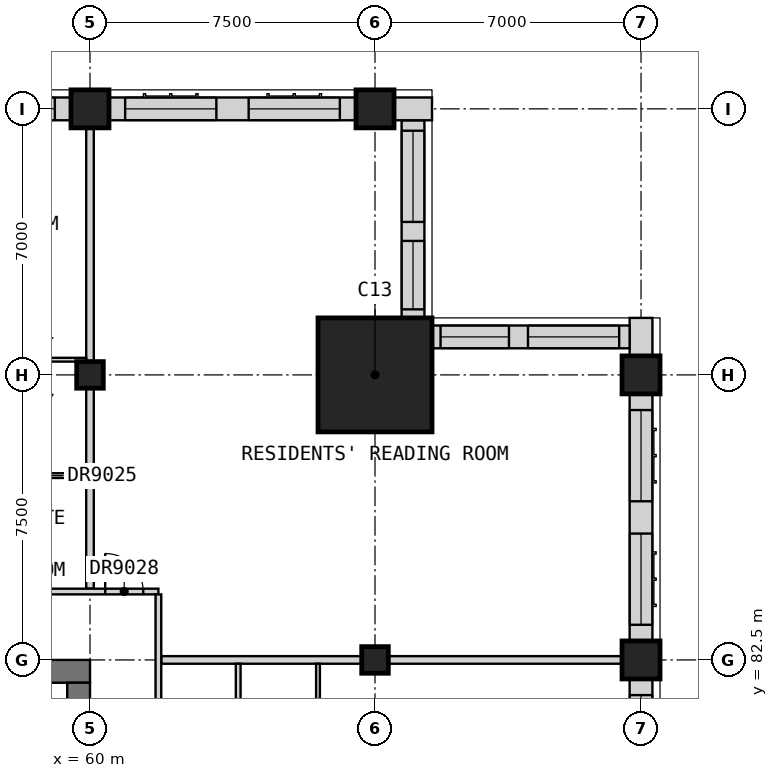
"""IFC4 building model, lengths in metres.
Left out: names, types, materials, properties, quantities, classifications, styles, units other than length and angle.
Written with IfcOpenShell. Run it as: python <this file> out.ifc"""

import sys

from ifc_helpers import new_model, si_unit, direction, frame, frame_2d, origin, origin_2d, place, context, subcontext, project, spatial, rectangle, extrude, element, fill, save


model = new_model("IFC4")
c1 = context("Model", 3, precision=1e-05, world=origin(), true_north=direction((0.0, 1.0)))
c2 = subcontext(c1, "Body", "Model", "MODEL_VIEW")
j1 = project(units=[si_unit("LENGTHUNIT", "METRE"), si_unit("PLANEANGLEUNIT", "RADIAN")], contexts=[c1])
p1 = place(None, origin())
s1 = spatial("IfcSite", under=j1, at=p1, CompositionType="ELEMENT")
p2 = place(p1, origin())
s2 = spatial("IfcBuilding", under=s1, at=p2, CompositionType="ELEMENT")
p3 = place(p2, frame((0.0, 0.0, 280.2)))
s3 = spatial("IfcBuildingStorey", under=s2, at=p3, CompositionType="ELEMENT", Elevation=280.2)
p4 = place(p3, frame((60.0, 90.0, 0.0), z_axis=(0.0, 0.0, 1.0), x_axis=(1.0, 0.0, 0.0)))
e1 = element("IfcColumn", 1, at=p4, inside=s3, PredefinedType="COLUMN", context=c2, shape_type="SweptSolid", body=[
    extrude(rectangle(XDim=0.7, YDim=0.7, at=origin_2d()), origin(), (0.0, 0.0, 1.0), 3.5),
])
p5 = place(p3, frame((60.0, 97.0, 0.0), z_axis=(0.0, 0.0, 1.0), x_axis=(1.0, 0.0, 0.0)))
e2 = element("IfcColumn", 2, at=p5, inside=s3, PredefinedType="COLUMN", context=c2, shape_type="SweptSolid", body=[
    extrude(rectangle(XDim=1.0, YDim=1.0, at=origin_2d()), origin(), (0.0, 0.0, 1.0), 3.5),
])
p6 = place(p3, frame((67.5, 82.5, 0.0), z_axis=(0.0, 0.0, 1.0), x_axis=(1.0, 0.0, 0.0)))
e3 = element("IfcColumn", 3, at=p6, inside=s3, PredefinedType="COLUMN", context=c2, shape_type="SweptSolid", body=[
    extrude(rectangle(XDim=0.7, YDim=0.7, at=origin_2d()), origin(), (0.0, 0.0, 1.0), 3.5),
])
for number, where, z_axis, x_axis in (
    (4, (67.5, 97.0, 0.0), (0.0, 0.0, 1.0), (1.0, 0.0, 0.0)),
    (5, (74.5, 82.5, 0.0), (0.0, 0.0, 1.0), (1.0, 0.0, 0.0)),
    (6, (74.5, 90.0, 0.0), (0.0, 0.0, 1.0), (1.0, 0.0, 0.0)),
):
    element("IfcColumn", number, at=place(p3, frame(where, z_axis=z_axis, x_axis=x_axis)), inside=s3, PredefinedType="COLUMN", context=c2, shape_type="SweptSolid", body=[
        extrude(rectangle(XDim=1.0, YDim=1.0, at=origin_2d()), origin(), (0.0, 0.0, 1.0), 3.5),
    ])
p7 = place(p3, frame((67.5, 90.0, 0.0), z_axis=(0.0, 0.0, 1.0), x_axis=(1.0, 0.0, 0.0)))
e7 = element("IfcColumn", 7, at=p7, inside=s3, PredefinedType="COLUMN", context=c2, shape_type="SweptSolid", body=[
    extrude(rectangle(XDim=3.0, YDim=3.0, at=origin_2d()), origin(), (0.0, 0.0, 1.0), 3.5),
])
p8 = place(p3, frame((30.0, 82.2, 0.0), z_axis=(0.0, 0.0, 1.0), x_axis=(1.0, 0.0, 0.0)))
e8 = element("IfcWall", 8, at=p8, inside=s3, PredefinedType="SHEAR", context=c2, shape_type="SweptSolid", body=[
    extrude(rectangle(XDim=30.0, YDim=0.6, at=frame_2d((15.0, 0.0))), origin(), (0.0, 0.0, 1.0), 3.5),
])
p9 = place(p3, frame((59.7, 60.6, 0.0), z_axis=(0.0, 0.0, 1.0), x_axis=(0.0, 1.0, 0.0)))
e9 = element("IfcWall", 9, at=p9, inside=s3, PredefinedType="SHEAR", context=c2, shape_type="SweptSolid", body=[
    extrude(rectangle(XDim=21.3, YDim=0.6, at=frame_2d((10.65, 0.0))), origin(), (0.0, 0.0, 1.0), 3.5),
])
p10 = place(p9, frame((14.9, 0.0, 0.0)))
e10 = element("IfcOpeningElement", 10, at=p10, cuts=e9, PredefinedType="OPENING", context=c2, shape_type="SweptSolid", body=[
    extrude(rectangle(XDim=1.8, YDim=2.1, at=frame_2d((0.9, 1.05))), frame((0.0, 0.31, 0.0), z_axis=(0.0, -1.0, 0.0), x_axis=(1.0, 0.0, 0.0)), (0.0, 0.0, 1.0), 0.62),
])
p11 = place(p3, frame((74.5, 75.5, 0.0), z_axis=(0.0, 0.0, 1.0), x_axis=(0.0, 1.0, 0.0)))
e11 = element("IfcWall", 11, at=p11, inside=s3, PredefinedType="SOLIDWALL", context=c2, shape_type="SweptSolid", body=[
    extrude(rectangle(XDim=6.5, YDim=0.6, at=frame_2d((3.25, 0.0))), origin(), (0.0, 0.0, 1.0), 2.75),
])
p12 = place(p11, frame((0.425, 0.0, 0.8)))
e12 = element("IfcOpeningElement", 12, at=p12, cuts=e11, PredefinedType="OPENING", context=c2, shape_type="SweptSolid", body=[
    extrude(rectangle(XDim=2.4, YDim=1.8, at=frame_2d((1.2, 0.9))), frame((0.0, 0.31, 0.0), z_axis=(0.0, -1.0, 0.0), x_axis=(1.0, 0.0, 0.0)), (0.0, 0.0, 1.0), 0.62),
])
p13 = place(p11, frame((3.675, 0.0, 0.8)))
e13 = element("IfcOpeningElement", 13, at=p13, cuts=e11, PredefinedType="OPENING", context=c2, shape_type="SweptSolid", body=[
    extrude(rectangle(XDim=2.4, YDim=1.8, at=frame_2d((1.2, 0.9))), frame((0.0, 0.31, 0.0), z_axis=(0.0, -1.0, 0.0), x_axis=(1.0, 0.0, 0.0)), (0.0, 0.0, 1.0), 0.62),
])
p14 = place(p3, frame((74.5, 83.0, 0.0), z_axis=(0.0, 0.0, 1.0), x_axis=(0.0, 1.0, 0.0)))
e14 = element("IfcWall", 14, at=p14, inside=s3, PredefinedType="SOLIDWALL", context=c2, shape_type="SweptSolid", body=[
    extrude(rectangle(XDim=6.5, YDim=0.6, at=frame_2d((3.25, 0.0))), origin(), (0.0, 0.0, 1.0), 2.75),
])
p15 = place(p14, frame((0.425, 0.0, 0.8)))
e15 = element("IfcOpeningElement", 15, at=p15, cuts=e14, PredefinedType="OPENING", context=c2, shape_type="SweptSolid", body=[
    extrude(rectangle(XDim=2.4, YDim=1.8, at=frame_2d((1.2, 0.9))), frame((0.0, 0.31, 0.0), z_axis=(0.0, -1.0, 0.0), x_axis=(1.0, 0.0, 0.0)), (0.0, 0.0, 1.0), 0.62),
])
p16 = place(p14, frame((3.675, 0.0, 0.8)))
e16 = element("IfcOpeningElement", 16, at=p16, cuts=e14, PredefinedType="OPENING", context=c2, shape_type="SweptSolid", body=[
    extrude(rectangle(XDim=2.4, YDim=1.8, at=frame_2d((1.2, 0.9))), frame((0.0, 0.31, 0.0), z_axis=(0.0, -1.0, 0.0), x_axis=(1.0, 0.0, 0.0)), (0.0, 0.0, 1.0), 0.62),
])
p17 = place(p3, frame((74.5, 90.5, 0.0), z_axis=(0.0, 0.0, 1.0), x_axis=(0.0, 1.0, 0.0)))
e17 = element("IfcWall", 17, at=p17, inside=s3, PredefinedType="SOLIDWALL", context=c2, shape_type="SweptSolid", body=[
    extrude(rectangle(XDim=1.0, YDim=0.6, at=frame_2d((0.5, 0.0))), origin(), (0.0, 0.0, 1.0), 3.25),
])
p18 = place(p3, frame((74.2, 91.0, 0.0), z_axis=(0.0, 0.0, 1.0), x_axis=(-1.0, 0.0, 0.0)))
e18 = element("IfcWall", 18, at=p18, inside=s3, PredefinedType="SOLIDWALL", context=c2, shape_type="SweptSolid", body=[
    extrude(rectangle(XDim=5.2, YDim=0.6, at=frame_2d((2.6, 0.0))), origin(), (0.0, 0.0, 1.0), 3.25),
])
p19 = place(p18, frame((3.175, 0.0, 0.8)))
e19 = element("IfcOpeningElement", 19, at=p19, cuts=e18, PredefinedType="OPENING", context=c2, shape_type="SweptSolid", body=[
    extrude(rectangle(XDim=1.8, YDim=1.8, at=frame_2d((0.9, 0.9))), frame((0.0, 0.31, 0.0), z_axis=(0.0, -1.0, 0.0), x_axis=(1.0, 0.0, 0.0)), (0.0, 0.0, 1.0), 0.62),
])
p20 = place(p18, frame((0.275, 0.0, 0.8)))
e20 = element("IfcOpeningElement", 20, at=p20, cuts=e18, PredefinedType="OPENING", context=c2, shape_type="SweptSolid", body=[
    extrude(rectangle(XDim=2.4, YDim=1.8, at=frame_2d((1.2, 0.9))), frame((0.0, 0.31, 0.0), z_axis=(0.0, -1.0, 0.0), x_axis=(1.0, 0.0, 0.0)), (0.0, 0.0, 1.0), 0.62),
])
p21 = place(p3, frame((68.5, 91.5, 0.0), z_axis=(0.0, 0.0, 1.0), x_axis=(0.0, 1.0, 0.0)))
e21 = element("IfcWall", 21, at=p21, inside=s3, PredefinedType="SOLIDWALL", context=c2, shape_type="SweptSolid", body=[
    extrude(rectangle(XDim=5.2, YDim=0.6, at=frame_2d((2.6, 0.0))), origin(), (0.0, 0.0, 1.0), 3.25),
])
p22 = place(p21, frame((0.225, 0.0, 0.8)))
e22 = element("IfcOpeningElement", 22, at=p22, cuts=e21, PredefinedType="OPENING", context=c2, shape_type="SweptSolid", body=[
    extrude(rectangle(XDim=1.8, YDim=1.8, at=frame_2d((0.9, 0.9))), frame((0.0, 0.31, 0.0), z_axis=(0.0, -1.0, 0.0), x_axis=(1.0, 0.0, 0.0)), (0.0, 0.0, 1.0), 0.62),
])
p23 = place(p21, frame((2.525, 0.0, 0.8)))
e23 = element("IfcOpeningElement", 23, at=p23, cuts=e21, PredefinedType="OPENING", context=c2, shape_type="SweptSolid", body=[
    extrude(rectangle(XDim=2.4, YDim=1.8, at=frame_2d((1.2, 0.9))), frame((0.0, 0.31, 0.0), z_axis=(0.0, -1.0, 0.0), x_axis=(1.0, 0.0, 0.0)), (0.0, 0.0, 1.0), 0.62),
])
p24 = place(p3, frame((69.0, 97.0, 0.0), z_axis=(0.0, 0.0, 1.0), x_axis=(-1.0, 0.0, 0.0)))
e24 = element("IfcWall", 24, at=p24, inside=s3, PredefinedType="SOLIDWALL", context=c2, shape_type="SweptSolid", body=[
    extrude(rectangle(XDim=1.0, YDim=0.6, at=frame_2d((0.5, 0.0))), origin(), (0.0, 0.0, 1.0), 3.25),
])
p25 = place(p3, frame((67.0, 97.0, 0.0), z_axis=(0.0, 0.0, 1.0), x_axis=(-1.0, 0.0, 0.0)))
e25 = element("IfcWall", 25, at=p25, inside=s3, PredefinedType="SOLIDWALL", context=c2, shape_type="SweptSolid", body=[
    extrude(rectangle(XDim=6.5, YDim=0.6, at=frame_2d((3.25, 0.0))), origin(), (0.0, 0.0, 1.0), 2.75),
])
p26 = place(p25, frame((3.675, 0.0, 0.8)))
e26 = element("IfcOpeningElement", 26, at=p26, cuts=e25, PredefinedType="OPENING", context=c2, shape_type="SweptSolid", body=[
    extrude(rectangle(XDim=2.4, YDim=1.8, at=frame_2d((1.2, 0.9))), frame((0.0, 0.31, 0.0), z_axis=(0.0, -1.0, 0.0), x_axis=(1.0, 0.0, 0.0)), (0.0, 0.0, 1.0), 0.62),
])
p27 = place(p25, frame((0.425, 0.0, 0.8)))
e27 = element("IfcOpeningElement", 27, at=p27, cuts=e25, PredefinedType="OPENING", context=c2, shape_type="SweptSolid", body=[
    extrude(rectangle(XDim=2.4, YDim=1.8, at=frame_2d((1.2, 0.9))), frame((0.0, 0.31, 0.0), z_axis=(0.0, -1.0, 0.0), x_axis=(1.0, 0.0, 0.0)), (0.0, 0.0, 1.0), 0.62),
])
p28 = place(p3, frame((59.5, 97.0, 0.0), z_axis=(0.0, 0.0, 1.0), x_axis=(-1.0, 0.0, 0.0)))
e28 = element("IfcWall", 28, at=p28, inside=s3, PredefinedType="SOLIDWALL", context=c2, shape_type="SweptSolid", body=[
    extrude(rectangle(XDim=6.5, YDim=0.6, at=frame_2d((3.25, 0.0))), origin(), (0.0, 0.0, 1.0), 2.75),
])
p29 = place(p28, frame((3.675, 0.0, 0.8)))
e29 = element("IfcOpeningElement", 29, at=p29, cuts=e28, PredefinedType="OPENING", context=c2, shape_type="SweptSolid", body=[
    extrude(rectangle(XDim=2.4, YDim=1.8, at=frame_2d((1.2, 0.9))), frame((0.0, 0.31, 0.0), z_axis=(0.0, -1.0, 0.0), x_axis=(1.0, 0.0, 0.0)), (0.0, 0.0, 1.0), 0.62),
])
p30 = place(p28, frame((0.425, 0.0, 0.8)))
e30 = element("IfcOpeningElement", 30, at=p30, cuts=e28, PredefinedType="OPENING", context=c2, shape_type="SweptSolid", body=[
    extrude(rectangle(XDim=2.4, YDim=1.8, at=frame_2d((1.2, 0.9))), frame((0.0, 0.31, 0.0), z_axis=(0.0, -1.0, 0.0), x_axis=(1.0, 0.0, 0.0)), (0.0, 0.0, 1.0), 0.62),
])
for number, where, z_axis, x_axis in (
    (31, (61.875, 82.5, 0.0), (0.0, 0.0, 1.0), (1.0, 0.0, 0.0)),
    (32, (60.0, 84.375, 0.0), (0.0, 0.0, 1.0), (0.0, 1.0, 0.0)),
):
    element("IfcWall", number, at=place(p3, frame(where, z_axis=z_axis, x_axis=x_axis)), inside=s3, PredefinedType="PARTITIONING", context=c2, shape_type="SweptSolid", body=[
        extrude(rectangle(XDim=13.125, YDim=0.2, at=frame_2d((6.562, 0.0))), origin(), (0.0, 0.0, 1.0), 3.25),
    ])
p31 = place(p3, frame((33.75, 84.3, 0.0), z_axis=(0.0, 0.0, 1.0), x_axis=(1.0, 0.0, 0.0)))
e33 = element("IfcWall", 33, at=p31, inside=s3, PredefinedType="PARTITIONING", context=c2, shape_type="SweptSolid", body=[
    extrude(rectangle(XDim=28.05, YDim=0.15, at=frame_2d((14.025, 0.0))), origin(), (0.0, 0.0, 1.0), 3.25),
])
p32 = place(p31, frame((5.125, 0.0, 0.0)))
e34 = element("IfcOpeningElement", 34, at=p32, cuts=e33, PredefinedType="OPENING", context=c2, shape_type="SweptSolid", body=[
    extrude(rectangle(XDim=1.0, YDim=2.1, at=frame_2d((0.5, 1.05))), frame((0.0, 0.085, 0.0), z_axis=(0.0, -1.0, 0.0), x_axis=(1.0, 0.0, 0.0)), (0.0, 0.0, 1.0), 0.17),
])
p33 = place(p31, frame((12.675, 0.0, 0.0)))
e35 = element("IfcOpeningElement", 35, at=p33, cuts=e33, PredefinedType="OPENING", context=c2, shape_type="SweptSolid", body=[
    extrude(rectangle(XDim=0.9, YDim=2.1, at=frame_2d((0.45, 1.05))), frame((0.0, 0.085, 0.0), z_axis=(0.0, -1.0, 0.0), x_axis=(1.0, 0.0, 0.0)), (0.0, 0.0, 1.0), 0.17),
])
p34 = place(p31, frame((26.65, 0.0, 0.0)))
e36 = element("IfcOpeningElement", 36, at=p34, cuts=e33, PredefinedType="OPENING", context=c2, shape_type="SweptSolid", body=[
    extrude(rectangle(XDim=1.0, YDim=2.1, at=frame_2d((0.5, 1.05))), frame((0.0, 0.085, 0.0), z_axis=(0.0, -1.0, 0.0), x_axis=(1.0, 0.0, 0.0)), (0.0, 0.0, 1.0), 0.17),
])
p35 = place(p3, frame((61.8, 58.275, 0.0), z_axis=(0.0, 0.0, 1.0), x_axis=(0.0, 1.0, 0.0)))
e37 = element("IfcWall", 37, at=p35, inside=s3, PredefinedType="PARTITIONING", context=c2, shape_type="SweptSolid", body=[
    extrude(rectangle(XDim=25.95, YDim=0.15, at=frame_2d((12.975, 0.0))), origin(), (0.0, 0.0, 1.0), 3.25),
])
p36 = place(p35, frame((3.15, 0.0, 0.0)))
e38 = element("IfcOpeningElement", 38, at=p36, cuts=e37, PredefinedType="OPENING", context=c2, shape_type="SweptSolid", body=[
    extrude(rectangle(XDim=0.9, YDim=2.1, at=frame_2d((0.45, 1.05))), frame((0.0, 0.085, 0.0), z_axis=(0.0, -1.0, 0.0), x_axis=(1.0, 0.0, 0.0)), (0.0, 0.0, 1.0), 0.17),
])
p37 = place(p35, frame((18.15, 0.0, 0.0)))
e39 = element("IfcOpeningElement", 39, at=p37, cuts=e37, PredefinedType="OPENING", context=c2, shape_type="SweptSolid", body=[
    extrude(rectangle(XDim=0.9, YDim=2.1, at=frame_2d((0.45, 1.05))), frame((0.0, 0.085, 0.0), z_axis=(0.0, -1.0, 0.0), x_axis=(1.0, 0.0, 0.0)), (0.0, 0.0, 1.0), 0.17),
])
p38 = place(p3, frame((45.1, 90.4, 0.0), z_axis=(0.0, 0.0, 1.0), x_axis=(1.0, 0.0, 0.0)))
e40 = element("IfcWall", 40, at=p38, inside=s3, PredefinedType="PARTITIONING", context=c2, shape_type="SweptSolid", body=[
    extrude(rectangle(XDim=14.8, YDim=0.1, at=frame_2d((7.4, 0.0))), origin(), (0.0, 0.0, 1.0), 3.25),
])
p39 = place(p38, frame((1.325, 0.0, 0.0)))
e41 = element("IfcOpeningElement", 41, at=p39, cuts=e40, PredefinedType="OPENING", context=c2, shape_type="SweptSolid", body=[
    extrude(rectangle(XDim=0.9, YDim=2.1, at=frame_2d((0.45, 1.05))), frame((0.0, 0.06, 0.0), z_axis=(0.0, -1.0, 0.0), x_axis=(1.0, 0.0, 0.0)), (0.0, 0.0, 1.0), 0.12),
])
p40 = place(p38, frame((8.825, 0.0, 0.0)))
e42 = element("IfcOpeningElement", 42, at=p40, cuts=e40, PredefinedType="OPENING", context=c2, shape_type="SweptSolid", body=[
    extrude(rectangle(XDim=0.9, YDim=2.1, at=frame_2d((0.45, 1.05))), frame((0.0, 0.06, 0.0), z_axis=(0.0, -1.0, 0.0), x_axis=(1.0, 0.0, 0.0)), (0.0, 0.0, 1.0), 0.12),
])
p41 = place(p38, frame((12.575, 0.0, 0.0)))
e43 = element("IfcOpeningElement", 43, at=p41, cuts=e40, PredefinedType="OPENING", context=c2, shape_type="SweptSolid", body=[
    extrude(rectangle(XDim=0.9, YDim=2.1, at=frame_2d((0.45, 1.05))), frame((0.0, 0.06, 0.0), z_axis=(0.0, -1.0, 0.0), x_axis=(1.0, 0.0, 0.0)), (0.0, 0.0, 1.0), 0.12),
])
p42 = place(p3, frame((66.0, 60.1, 0.0), z_axis=(0.0, 0.0, 1.0), x_axis=(0.0, 1.0, 0.0)))
e44 = element("IfcWall", 44, at=p42, inside=s3, PredefinedType="PARTITIONING", context=c2, shape_type="SweptSolid", body=[
    extrude(rectangle(XDim=22.3, YDim=0.1, at=frame_2d((11.15, 0.0))), origin(), (0.0, 0.0, 1.0), 3.25),
])
p43 = place(p42, frame((1.325, 0.0, 0.0)))
e45 = element("IfcOpeningElement", 45, at=p43, cuts=e44, PredefinedType="OPENING", context=c2, shape_type="SweptSolid", body=[
    extrude(rectangle(XDim=0.9, YDim=2.1, at=frame_2d((0.45, 1.05))), frame((0.0, 0.06, 0.0), z_axis=(0.0, -1.0, 0.0), x_axis=(1.0, 0.0, 0.0)), (0.0, 0.0, 1.0), 0.12),
])
p44 = place(p42, frame((8.825, 0.0, 0.0)))
e46 = element("IfcOpeningElement", 46, at=p44, cuts=e44, PredefinedType="OPENING", context=c2, shape_type="SweptSolid", body=[
    extrude(rectangle(XDim=0.9, YDim=2.1, at=frame_2d((0.45, 1.05))), frame((0.0, 0.06, 0.0), z_axis=(0.0, -1.0, 0.0), x_axis=(1.0, 0.0, 0.0)), (0.0, 0.0, 1.0), 0.12),
])
p45 = place(p42, frame((12.575, 0.0, 0.0)))
e47 = element("IfcOpeningElement", 47, at=p45, cuts=e44, PredefinedType="OPENING", context=c2, shape_type="SweptSolid", body=[
    extrude(rectangle(XDim=0.9, YDim=2.1, at=frame_2d((0.45, 1.05))), frame((0.0, 0.06, 0.0), z_axis=(0.0, -1.0, 0.0), x_axis=(1.0, 0.0, 0.0)), (0.0, 0.0, 1.0), 0.12),
])
p46 = place(p42, frame((16.325, 0.0, 0.0)))
e48 = element("IfcOpeningElement", 48, at=p46, cuts=e44, PredefinedType="OPENING", context=c2, shape_type="SweptSolid", body=[
    extrude(rectangle(XDim=0.9, YDim=2.1, at=frame_2d((0.45, 1.05))), frame((0.0, 0.06, 0.0), z_axis=(0.0, -1.0, 0.0), x_axis=(1.0, 0.0, 0.0)), (0.0, 0.0, 1.0), 0.12),
])
p47 = place(p3, frame((56.25, 87.35, 0.0), z_axis=(0.0, 0.0, 1.0), x_axis=(1.0, 0.0, 0.0)))
e49 = element("IfcWall", 49, at=p47, inside=s3, PredefinedType="PARTITIONING", context=c2, shape_type="SweptSolid", body=[
    extrude(rectangle(XDim=3.65, YDim=0.125, at=frame_2d((1.825, 0.0))), origin(), (0.0, 0.0, 1.0), 3.25),
])
p48 = place(p47, frame((1.425, 0.0, 0.0)))
e50 = element("IfcOpeningElement", 50, at=p48, cuts=e49, PredefinedType="OPENING", context=c2, shape_type="SweptSolid", body=[
    extrude(rectangle(XDim=0.9, YDim=2.1, at=frame_2d((0.45, 1.05))), frame((0.0, 0.073, 0.0), z_axis=(0.0, -1.0, 0.0), x_axis=(1.0, 0.0, 0.0)), (0.0, 0.0, 1.0), 0.145),
])
p49 = place(p3, frame((63.9, 78.812, 0.0), z_axis=(0.0, 0.0, 1.0), x_axis=(0.0, 1.0, 0.0)))
e51 = element("IfcWall", 51, at=p49, inside=s3, PredefinedType="PARTITIONING", context=c2, shape_type="SweptSolid", body=[
    extrude(rectangle(XDim=3.587, YDim=0.125, at=frame_2d((1.794, 0.0))), origin(), (0.0, 0.0, 1.0), 3.25),
])
p50 = place(p13, origin())
e52 = element("IfcWindow", 52, at=p50, inside=s3, PartitioningType="SINGLE_PANEL", PredefinedType="WINDOW", context=c2, shape_type="SweptSolid", body=[
    extrude(rectangle(XDim=2.4, YDim=1.8, at=frame_2d((1.2, 0.9))), frame((0.0, -0.07, 0.0), z_axis=(0.0, -1.0, 0.0), x_axis=(1.0, 0.0, 0.0)), (0.0, 0.0, 1.0), 0.06),
])
fill(e13, e52)
p51 = place(p15, origin())
e53 = element("IfcWindow", 53, at=p51, inside=s3, PartitioningType="SINGLE_PANEL", PredefinedType="WINDOW", context=c2, shape_type="SweptSolid", body=[
    extrude(rectangle(XDim=2.4, YDim=1.8, at=frame_2d((1.2, 0.9))), frame((0.0, -0.07, 0.0), z_axis=(0.0, -1.0, 0.0), x_axis=(1.0, 0.0, 0.0)), (0.0, 0.0, 1.0), 0.06),
])
fill(e15, e53)
p52 = place(p16, origin())
e54 = element("IfcWindow", 54, at=p52, inside=s3, PartitioningType="SINGLE_PANEL", PredefinedType="WINDOW", context=c2, shape_type="SweptSolid", body=[
    extrude(rectangle(XDim=2.4, YDim=1.8, at=frame_2d((1.2, 0.9))), frame((0.0, -0.07, 0.0), z_axis=(0.0, -1.0, 0.0), x_axis=(1.0, 0.0, 0.0)), (0.0, 0.0, 1.0), 0.06),
])
fill(e16, e54)
p53 = place(p19, origin())
e55 = element("IfcWindow", 55, at=p53, inside=s3, PartitioningType="SINGLE_PANEL", PredefinedType="WINDOW", context=c2, shape_type="SweptSolid", body=[
    extrude(rectangle(XDim=1.8, YDim=1.8, at=frame_2d((0.9, 0.9))), frame((0.0, -0.07, 0.0), z_axis=(0.0, -1.0, 0.0), x_axis=(1.0, 0.0, 0.0)), (0.0, 0.0, 1.0), 0.06),
])
fill(e19, e55)
p54 = place(p20, origin())
e56 = element("IfcWindow", 56, at=p54, inside=s3, PartitioningType="SINGLE_PANEL", PredefinedType="WINDOW", context=c2, shape_type="SweptSolid", body=[
    extrude(rectangle(XDim=2.4, YDim=1.8, at=frame_2d((1.2, 0.9))), frame((0.0, -0.07, 0.0), z_axis=(0.0, -1.0, 0.0), x_axis=(1.0, 0.0, 0.0)), (0.0, 0.0, 1.0), 0.06),
])
fill(e20, e56)
p55 = place(p22, origin())
e57 = element("IfcWindow", 57, at=p55, inside=s3, PartitioningType="SINGLE_PANEL", PredefinedType="WINDOW", context=c2, shape_type="SweptSolid", body=[
    extrude(rectangle(XDim=1.8, YDim=1.8, at=frame_2d((0.9, 0.9))), frame((0.0, -0.07, 0.0), z_axis=(0.0, -1.0, 0.0), x_axis=(1.0, 0.0, 0.0)), (0.0, 0.0, 1.0), 0.06),
])
fill(e22, e57)
p56 = place(p23, origin())
e58 = element("IfcWindow", 58, at=p56, inside=s3, PartitioningType="SINGLE_PANEL", PredefinedType="WINDOW", context=c2, shape_type="SweptSolid", body=[
    extrude(rectangle(XDim=2.4, YDim=1.8, at=frame_2d((1.2, 0.9))), frame((0.0, -0.07, 0.0), z_axis=(0.0, -1.0, 0.0), x_axis=(1.0, 0.0, 0.0)), (0.0, 0.0, 1.0), 0.06),
])
fill(e23, e58)
p57 = place(p26, origin())
e59 = element("IfcWindow", 59, at=p57, inside=s3, PartitioningType="SINGLE_PANEL", PredefinedType="WINDOW", context=c2, shape_type="SweptSolid", body=[
    extrude(rectangle(XDim=2.4, YDim=1.8, at=frame_2d((1.2, 0.9))), frame((0.0, -0.07, 0.0), z_axis=(0.0, -1.0, 0.0), x_axis=(1.0, 0.0, 0.0)), (0.0, 0.0, 1.0), 0.06),
])
fill(e26, e59)
p58 = place(p27, origin())
e60 = element("IfcWindow", 60, at=p58, inside=s3, PartitioningType="SINGLE_PANEL", PredefinedType="WINDOW", context=c2, shape_type="SweptSolid", body=[
    extrude(rectangle(XDim=2.4, YDim=1.8, at=frame_2d((1.2, 0.9))), frame((0.0, -0.07, 0.0), z_axis=(0.0, -1.0, 0.0), x_axis=(1.0, 0.0, 0.0)), (0.0, 0.0, 1.0), 0.06),
])
fill(e27, e60)
p59 = place(p30, origin())
e61 = element("IfcWindow", 61, at=p59, inside=s3, PartitioningType="SINGLE_PANEL", PredefinedType="WINDOW", context=c2, shape_type="SweptSolid", body=[
    extrude(rectangle(XDim=2.4, YDim=1.8, at=frame_2d((1.2, 0.9))), frame((0.0, -0.07, 0.0), z_axis=(0.0, -1.0, 0.0), x_axis=(1.0, 0.0, 0.0)), (0.0, 0.0, 1.0), 0.06),
])
fill(e30, e61)
p60 = place(p34, origin())
e62 = element("IfcDoor", 62, at=p60, inside=s3, OperationType="SINGLE_SWING_LEFT", PredefinedType="DOOR", context=c2, shape_type="SweptSolid", body=[
    extrude(rectangle(XDim=1.0, YDim=2.1, at=frame_2d((0.5, 1.05))), frame((0.0, 0.025, 0.0), z_axis=(0.0, -1.0, 0.0), x_axis=(1.0, 0.0, 0.0)), (0.0, 0.0, 1.0), 0.05),
])
fill(e36, e62)
save(model, sys.argv[1])
